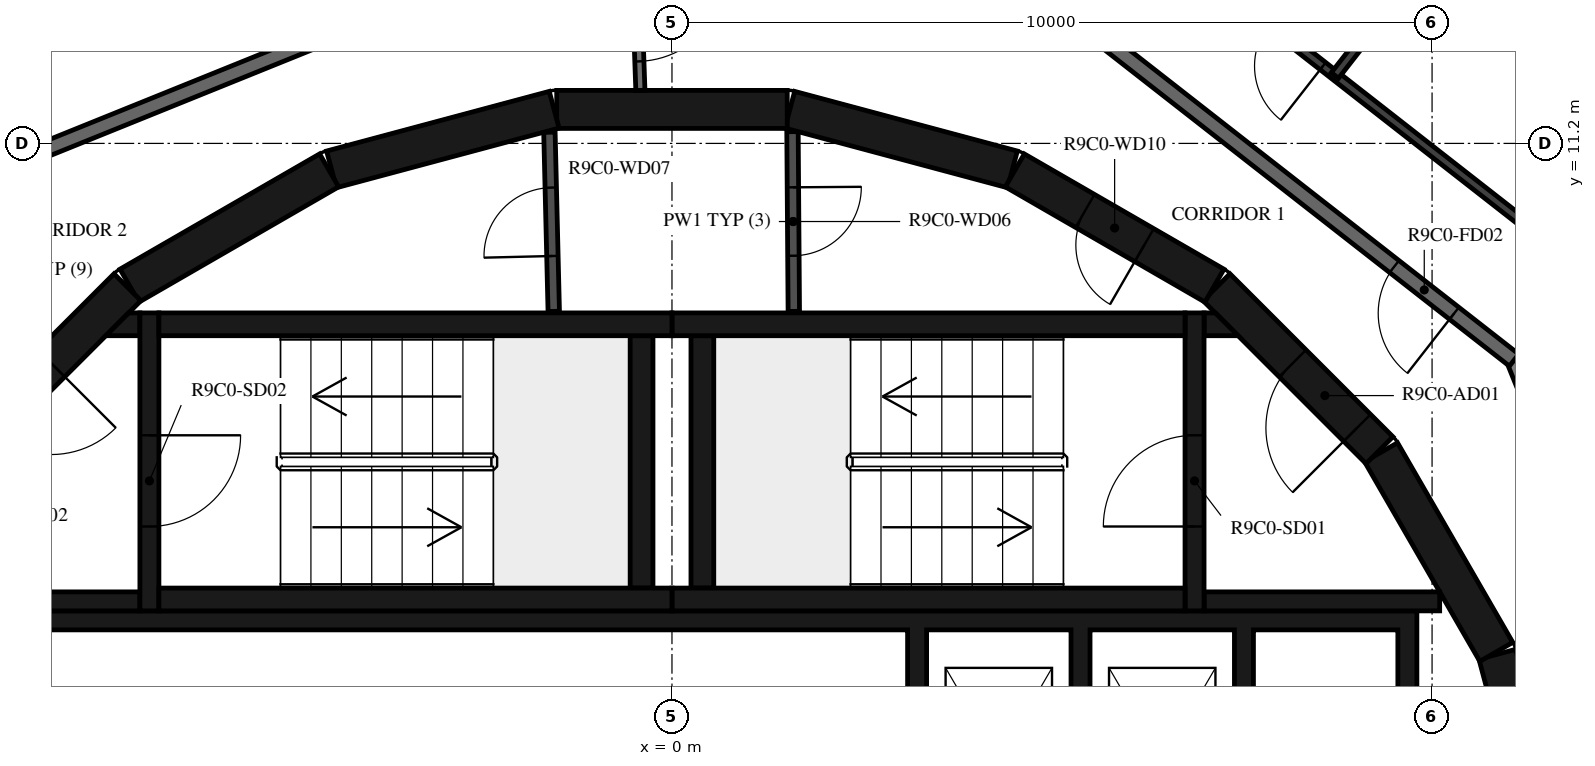
"""IFC4 building model, lengths in metres.
Left out: names, types, materials, properties, quantities, classifications, styles, units other than length and angle.
Written with IfcOpenShell. Run it as: python <this file> out.ifc"""

import sys

from ifc_helpers import new_model, si_unit, direction, frame, frame_2d, origin, place, context, subcontext, project, spatial, polyline, rectangle, outline, extrude, element, fill, save


model = new_model("IFC4")
c1 = context("Model", 3, precision=1e-05, world=origin(), true_north=direction((0.0, 1.0)))
c2 = subcontext(c1, "Body", "Model", "MODEL_VIEW")
j1 = project(units=[si_unit("LENGTHUNIT", "METRE"), si_unit("PLANEANGLEUNIT", "RADIAN")], contexts=[c1])
p1 = place(None, origin())
s1 = spatial("IfcSite", under=j1, at=p1, CompositionType="ELEMENT")
p2 = place(p1, origin())
s2 = spatial("IfcBuilding", under=s1, at=p2, CompositionType="ELEMENT")
p3 = place(p2, frame((0.0, 0.0, 354.0)))
s3 = spatial("IfcBuildingStorey", under=s2, at=p3, CompositionType="ELEMENT", Elevation=354.0)
for number, where, z_axis, x_axis in (
    (1, (11.643, 1.55, 0.0), (0.0, 0.0, 1.0), (-0.259, 0.966, 0.0)),
    (2, (10.845, 4.51, 0.0), (0.0, 0.0, 1.0), (-0.5, 0.866, 0.0)),
):
    element("IfcWall", number, at=place(p3, frame(where, z_axis=z_axis, x_axis=x_axis)), inside=s3, PredefinedType="SHEAR", context=c2, shape_type="SweptSolid", body=[
        extrude(rectangle(XDim=3.033, YDim=0.5, at=frame_2d((1.516, 0.0))), origin(), (0.0, 0.0, 1.0), 3.12),
    ])
p4 = place(p3, frame((9.308, 7.164, 0.0), z_axis=(0.0, 0.0, 1.0), x_axis=(-0.707106781187, 0.707106781187, 0.0)))
e3 = element("IfcWall", 3, at=p4, inside=s3, PredefinedType="SHEAR", context=c2, shape_type="SweptSolid", body=[
    extrude(rectangle(XDim=3.032, YDim=0.5, at=frame_2d((1.516, 0.0))), origin(), (0.0, 0.0, 1.0), 3.12),
])
p5 = place(p4, frame((0.416, 0.0, 0.0)))
e4 = element("IfcOpeningElement", 4, at=p5, cuts=e3, PredefinedType="OPENING", context=c2, shape_type="SweptSolid", body=[
    extrude(rectangle(XDim=1.2, YDim=2.1, at=frame_2d((0.6, 1.05))), frame((0.0, 0.26, 0.0), z_axis=(0.0, -1.0, 0.0), x_axis=(1.0, 0.0, 0.0)), (0.0, 0.0, 1.0), 0.52),
])
p6 = place(p3, frame((7.137, 9.329, 0.0), z_axis=(0.0, 0.0, 1.0), x_axis=(-0.865975092491, 0.500087131594, 0.0)))
e5 = element("IfcWall", 5, at=p6, inside=s3, PredefinedType="SHEAR", context=c2, shape_type="SweptSolid", body=[
    extrude(rectangle(XDim=3.033, YDim=0.5, at=frame_2d((1.516, 0.0))), origin(), (0.0, 0.0, 1.0), 3.12),
])
p7 = place(p6, frame((1.066, 0.0, 0.0)))
e6 = element("IfcOpeningElement", 6, at=p7, cuts=e5, PredefinedType="OPENING", context=c2, shape_type="SweptSolid", body=[
    extrude(rectangle(XDim=0.9, YDim=2.1, at=frame_2d((0.45, 1.05))), frame((0.0, 0.26, 0.0), z_axis=(0.0, -1.0, 0.0), x_axis=(1.0, 0.0, 0.0)), (0.0, 0.0, 1.0), 0.52),
])
for number, where, z_axis, x_axis in (
    (7, (4.479, 10.858, 0.0), (0.0, 0.0, 1.0), (-0.966, 0.259, 0.0)),
    (8, (1.516, 11.647, 0.0), (0.0, 0.0, 1.0), (-1.0, 0.0, 0.0)),
    (9, (-1.55, 11.643, 0.0), (0.0, 0.0, 1.0), (-0.966, -0.259, 0.0)),
    (10, (-4.51, 10.845, 0.0), (0.0, 0.0, 1.0), (-0.866, -0.5, 0.0)),
):
    element("IfcWall", number, at=place(p3, frame(where, z_axis=z_axis, x_axis=x_axis)), inside=s3, PredefinedType="SHEAR", context=c2, shape_type="SweptSolid", body=[
        extrude(rectangle(XDim=3.033, YDim=0.5, at=frame_2d((1.516, 0.0))), origin(), (0.0, 0.0, 1.0), 3.12),
    ])
p8 = place(p3, frame((-7.164, 9.308, 0.0), z_axis=(0.0, 0.0, 1.0), x_axis=(-0.707106781187, -0.707106781187, 0.0)))
e11 = element("IfcWall", 11, at=p8, inside=s3, PredefinedType="SHEAR", context=c2, shape_type="SweptSolid", body=[
    extrude(rectangle(XDim=3.032, YDim=0.5, at=frame_2d((1.516, 0.0))), origin(), (0.0, 0.0, 1.0), 3.12),
])
p9 = place(p8, frame((1.416, 0.0, 0.0)))
e12 = element("IfcOpeningElement", 12, at=p9, cuts=e11, PredefinedType="OPENING", context=c2, shape_type="SweptSolid", body=[
    extrude(rectangle(XDim=1.2, YDim=2.1, at=frame_2d((0.6, 1.05))), frame((0.0, 0.26, 0.0), z_axis=(0.0, -1.0, 0.0), x_axis=(1.0, 0.0, 0.0)), (0.0, 0.0, 1.0), 0.52),
])
for number, where, z_axis, x_axis in (
    (13, (0.0, 5.2, 0.0), (0.0, 0.0, 1.0), (1.0, 0.0, 0.0)),
    (14, (0.0, 8.82, 0.0), (0.0, 0.0, 1.0), (1.0, 0.0, 0.0)),
):
    element("IfcWall", number, at=place(p3, frame(where, z_axis=z_axis, x_axis=x_axis)), inside=s3, PredefinedType="SHEAR", context=c2, shape_type="SweptSolid", body=[
        extrude(rectangle(XDim=6.75, YDim=0.3, at=frame_2d((3.375, 0.0))), origin(), (0.0, 0.0, 1.0), 3.12),
    ])
p10 = place(p3, frame((0.4, 5.35, 0.0), z_axis=(0.0, 0.0, 1.0), x_axis=(0.0, 1.0, 0.0)))
e15 = element("IfcWall", 15, at=p10, inside=s3, PredefinedType="SHEAR", context=c2, shape_type="SweptSolid", body=[
    extrude(rectangle(XDim=3.32, YDim=0.3, at=frame_2d((1.66, 0.0))), origin(), (0.0, 0.0, 1.0), 3.12),
])
p11 = place(p3, frame((6.875, 5.05, 0.0), z_axis=(0.0, 0.0, 1.0), x_axis=(0.0, 1.0, 0.0)))
e16 = element("IfcWall", 16, at=p11, inside=s3, PredefinedType="SHEAR", context=c2, shape_type="SweptSolid", body=[
    extrude(rectangle(XDim=3.92, YDim=0.25, at=frame_2d((1.96, 0.0))), origin(), (0.0, 0.0, 1.0), 3.12),
])
p12 = place(p11, frame((1.11, 0.0, 0.0)))
e17 = element("IfcOpeningElement", 17, at=p12, cuts=e16, PredefinedType="OPENING", context=c2, shape_type="SweptSolid", body=[
    extrude(rectangle(XDim=1.2, YDim=2.1, at=frame_2d((0.6, 1.05))), frame((0.0, 0.135, 0.0), z_axis=(0.0, -1.0, 0.0), x_axis=(1.0, 0.0, 0.0)), (0.0, 0.0, 1.0), 0.27),
])
p13 = place(p3, frame((7.0, 5.175, 0.0), z_axis=(0.0, 0.0, 1.0), x_axis=(1.0, 0.0, 0.0)))
e18 = element("IfcWall", 18, at=p13, inside=s3, PredefinedType="SHEAR", context=c2, shape_type="SweptSolid", body=[
    extrude(rectangle(XDim=3.1, YDim=0.25, at=frame_2d((1.55, 0.0))), origin(), (0.0, 0.0, 1.0), 3.12),
])
p14 = place(p3, origin())
e19 = element("IfcWall", 19, at=p14, inside=s3, PredefinedType="SHEAR", context=c2, shape_type="SweptSolid", body=[
    extrude(outline(polyline([(7.448, 8.67), (7.0, 8.67), (7.0, 8.97), (7.148, 8.97), (7.448, 8.67)])), origin(), (0.0, 0.0, 1.0), 3.12),
])
for number, where, z_axis, x_axis in (
    (20, (-6.75, 5.2, 0.0), (0.0, 0.0, 1.0), (1.0, 0.0, 0.0)),
    (21, (-6.75, 8.82, 0.0), (0.0, 0.0, 1.0), (1.0, 0.0, 0.0)),
):
    element("IfcWall", number, at=place(p3, frame(where, z_axis=z_axis, x_axis=x_axis)), inside=s3, PredefinedType="SHEAR", context=c2, shape_type="SweptSolid", body=[
        extrude(rectangle(XDim=6.75, YDim=0.3, at=frame_2d((3.375, 0.0))), origin(), (0.0, 0.0, 1.0), 3.12),
    ])
p15 = place(p3, frame((-0.4, 5.35, 0.0), z_axis=(0.0, 0.0, 1.0), x_axis=(0.0, 1.0, 0.0)))
e22 = element("IfcWall", 22, at=p15, inside=s3, PredefinedType="SHEAR", context=c2, shape_type="SweptSolid", body=[
    extrude(rectangle(XDim=3.32, YDim=0.3, at=frame_2d((1.66, 0.0))), origin(), (0.0, 0.0, 1.0), 3.12),
])
p16 = place(p3, frame((-6.875, 8.97, 0.0), z_axis=(0.0, 0.0, 1.0), x_axis=(0.0, -1.0, 0.0)))
e23 = element("IfcWall", 23, at=p16, inside=s3, PredefinedType="SHEAR", context=c2, shape_type="SweptSolid", body=[
    extrude(rectangle(XDim=3.92, YDim=0.25, at=frame_2d((1.96, 0.0))), origin(), (0.0, 0.0, 1.0), 3.12),
])
p17 = place(p16, frame((1.61, 0.0, 0.0)))
e24 = element("IfcOpeningElement", 24, at=p17, cuts=e23, PredefinedType="OPENING", context=c2, shape_type="SweptSolid", body=[
    extrude(rectangle(XDim=1.2, YDim=2.1, at=frame_2d((0.6, 1.05))), frame((0.0, 0.135, 0.0), z_axis=(0.0, -1.0, 0.0), x_axis=(1.0, 0.0, 0.0)), (0.0, 0.0, 1.0), 0.27),
])
p18 = place(p3, frame((-7.0, 5.175, 0.0), z_axis=(0.0, 0.0, 1.0), x_axis=(-1.0, 0.0, 0.0)))
e25 = element("IfcWall", 25, at=p18, inside=s3, PredefinedType="SHEAR", context=c2, shape_type="SweptSolid", body=[
    extrude(rectangle(XDim=3.1, YDim=0.25, at=frame_2d((1.55, 0.0))), origin(), (0.0, 0.0, 1.0), 3.12),
])
p19 = place(p3, origin())
e26 = element("IfcWall", 26, at=p19, inside=s3, PredefinedType="SHEAR", context=c2, shape_type="SweptSolid", body=[
    extrude(outline(polyline([(-7.148, 8.97), (-7.0, 8.97), (-7.0, 8.67), (-7.448, 8.67), (-7.148, 8.97)])), origin(), (0.0, 0.0, 1.0), 3.12),
])
p20 = place(p3, origin())
e27 = element("IfcWall", 27, at=p20, inside=s3, PredefinedType="SHEAR", context=c2, shape_type="SweptSolid", body=[
    extrude(outline(polyline([(-9.8, 1.9), (-9.55, 1.9), (-9.55, 4.8), (3.1, 4.8), (3.1, 1.9), (3.35, 1.9), (3.35, 4.8), (5.25, 4.8), (5.25, 1.9), (5.5, 1.9), (5.5, 4.8), (7.4, 4.8), (7.4, 1.9), (7.65, 1.9), (7.65, 4.8), (9.55, 4.8), (9.55, 1.9), (9.8, 1.9), (9.8, 4.8), (9.8, 5.05), (-9.8, 5.05), (-9.8, 4.8), (-9.8, 1.9)])), origin(), (0.0, 0.0, 1.0), 3.12),
])
p21 = place(p3, frame((1.586, 11.354, 0.0), z_axis=(0.0, 0.0, 1.0), x_axis=(0.007227482881, -0.999973881405, 0.0)))
e28 = element("IfcWall", 28, at=p21, inside=s3, PredefinedType="PARTITIONING", context=c2, shape_type="SweptSolid", body=[
    extrude(rectangle(XDim=2.365, YDim=0.15, at=frame_2d((1.182, 0.0))), origin(), (0.0, 0.0, 1.0), 3.12),
])
p22 = place(p21, frame((0.732, 0.0, 0.0)))
e29 = element("IfcOpeningElement", 29, at=p22, cuts=e28, PredefinedType="OPENING", context=c2, shape_type="SweptSolid", body=[
    extrude(rectangle(XDim=0.9, YDim=2.1, at=frame_2d((0.45, 1.05))), frame((0.0, 0.085, 0.0), z_axis=(0.0, -1.0, 0.0), x_axis=(1.0, 0.0, 0.0)), (0.0, 0.0, 1.0), 0.17),
])
p23 = place(p3, frame((-1.555, 8.99, 0.0), z_axis=(0.0, 0.0, 1.0), x_axis=(-0.024125549686, 0.999708936567, 0.0)))
e30 = element("IfcWall", 30, at=p23, inside=s3, PredefinedType="PARTITIONING", context=c2, shape_type="SweptSolid", body=[
    extrude(rectangle(XDim=2.358, YDim=0.15, at=frame_2d((1.179, 0.0))), origin(), (0.0, 0.0, 1.0), 3.12),
])
p24 = place(p23, frame((0.729, 0.0, 0.0)))
e31 = element("IfcOpeningElement", 31, at=p24, cuts=e30, PredefinedType="OPENING", context=c2, shape_type="SweptSolid", body=[
    extrude(rectangle(XDim=0.9, YDim=2.1, at=frame_2d((0.45, 1.05))), frame((0.0, 0.085, 0.0), z_axis=(0.0, -1.0, 0.0), x_axis=(1.0, 0.0, 0.0)), (0.0, 0.0, 1.0), 0.17),
])
p25 = place(p3, frame((-0.475, 13.598, 0.0), z_axis=(0.0, 0.0, 1.0), x_axis=(0.034852521429, -0.999392466326, 0.0)))
e32 = element("IfcWall", 32, at=p25, inside=s3, PredefinedType="PARTITIONING", context=c2, shape_type="SweptSolid", body=[
    extrude(rectangle(XDim=1.702, YDim=0.12, at=frame_2d((0.851, 0.0))), origin(), (0.0, 0.0, 1.0), 3.12),
])
p26 = place(p25, frame((0.12, 0.0, 0.0)))
e33 = element("IfcOpeningElement", 33, at=p26, cuts=e32, PredefinedType="OPENING", context=c2, shape_type="SweptSolid", body=[
    extrude(rectangle(XDim=1.2, YDim=2.1, at=frame_2d((0.6, 1.05))), frame((0.0, 0.07, 0.0), z_axis=(0.0, -1.0, 0.0), x_axis=(1.0, 0.0, 0.0)), (0.0, 0.0, 1.0), 0.14),
])
p27 = place(p3, frame((13.769, 1.691, 0.0), z_axis=(0.0, 0.0, 1.0), x_axis=(-0.374618189599, 0.92717916932, 0.0)))
e34 = element("IfcWall", 34, at=p27, inside=s3, PredefinedType="STANDARD", context=c2, shape_type="SweptSolid", body=[
    extrude(rectangle(XDim=7.181, YDim=0.2, at=frame_2d((3.591, 0.0))), origin(), (0.0, 0.0, 1.0), 3.12),
])
p28 = place(p27, frame((2.41, 0.0, 0.0)))
e35 = element("IfcOpeningElement", 35, at=p28, cuts=e34, PredefinedType="OPENING", context=c2, shape_type="SweptSolid", body=[
    extrude(rectangle(XDim=1.0, YDim=2.1, at=frame_2d((0.5, 1.05))), frame((0.0, 0.11, 0.0), z_axis=(0.0, -1.0, 0.0), x_axis=(1.0, 0.0, 0.0)), (0.0, 0.0, 1.0), 0.22),
])
p29 = place(p3, frame((11.079, 8.349, 0.0), z_axis=(0.0, 0.0, 1.0), x_axis=(-0.78800478687, 0.615669112324, 0.0)))
e36 = element("IfcWall", 36, at=p29, inside=s3, PredefinedType="STANDARD", context=c2, shape_type="SweptSolid", body=[
    extrude(rectangle(XDim=7.181, YDim=0.2, at=frame_2d((3.591, 0.0))), origin(), (0.0, 0.0, 1.0), 3.12),
])
p30 = place(p29, frame((1.0, 0.0, 0.0)))
e37 = element("IfcOpeningElement", 37, at=p30, cuts=e36, PredefinedType="OPENING", context=c2, shape_type="SweptSolid", body=[
    extrude(rectangle(XDim=1.0, YDim=2.1, at=frame_2d((0.5, 1.05))), frame((0.0, 0.11, 0.0), z_axis=(0.0, -1.0, 0.0), x_axis=(1.0, 0.0, 0.0)), (0.0, 0.0, 1.0), 0.22),
])
p31 = place(p3, frame((-1.691, 13.769, 0.0), z_axis=(0.0, 0.0, 1.0), x_axis=(-0.92717916932, -0.374618189599, 0.0)))
e38 = element("IfcWall", 38, at=p31, inside=s3, PredefinedType="STANDARD", context=c2, shape_type="SweptSolid", body=[
    extrude(rectangle(XDim=7.181, YDim=0.2, at=frame_2d((3.591, 0.0))), origin(), (0.0, 0.0, 1.0), 3.12),
])
p32 = place(p3, frame((12.254, 9.334, 0.0), z_axis=(0.0, 0.0, 1.0), x_axis=(-0.787994393996, 0.615682414098, 0.0)))
e39 = element("IfcWall", 39, at=p32, inside=s3, PredefinedType="PARTITIONING", context=c2, shape_type="SweptSolid", body=[
    extrude(rectangle(XDim=7.902, YDim=0.12, at=frame_2d((3.951, 0.0))), origin(), (0.0, 0.0, 1.0), 3.12),
])
p33 = place(p32, frame((0.2, 0.0, 0.0)))
e40 = element("IfcOpeningElement", 40, at=p33, cuts=e39, PredefinedType="OPENING", context=c2, shape_type="SweptSolid", body=[
    extrude(rectangle(XDim=0.9, YDim=2.1, at=frame_2d((0.45, 1.05))), frame((0.0, 0.07, 0.0), z_axis=(0.0, -1.0, 0.0), x_axis=(1.0, 0.0, 0.0)), (0.0, 0.0, 1.0), 0.14),
])
p34 = place(p32, frame((4.683, 0.0, 0.0)))
e41 = element("IfcOpeningElement", 41, at=p34, cuts=e39, PredefinedType="OPENING", context=c2, shape_type="SweptSolid", body=[
    extrude(rectangle(XDim=0.9, YDim=2.1, at=frame_2d((0.45, 1.05))), frame((0.0, 0.07, 0.0), z_axis=(0.0, -1.0, 0.0), x_axis=(1.0, 0.0, 0.0)), (0.0, 0.0, 1.0), 0.14),
])
p35 = place(p3, frame((11.315, 15.414, 0.0), z_axis=(0.0, 0.0, 1.0), x_axis=(-0.615656413137, -0.788014708596, 0.0)))
e42 = element("IfcWall", 42, at=p35, inside=s3, PredefinedType="PARTITIONING", context=c2, shape_type="SweptSolid", body=[
    extrude(rectangle(XDim=4.213, YDim=0.12, at=frame_2d((2.106, 0.0))), origin(), (0.0, 0.0, 1.0), 3.12),
])
p36 = place(p3, frame((-6.118, 13.598, 0.0), z_axis=(0.0, 0.0, 1.0), x_axis=(-0.927163982911, -0.374655773735, 0.0)))
e43 = element("IfcWall", 43, at=p36, inside=s3, PredefinedType="PARTITIONING", context=c2, shape_type="SweptSolid", body=[
    extrude(rectangle(XDim=3.414, YDim=0.12, at=frame_2d((1.707, 0.0))), origin(), (0.0, 0.0, 1.0), 3.12),
])
p37 = place(p36, frame((0.2, 0.0, 0.0)))
e44 = element("IfcOpeningElement", 44, at=p37, cuts=e43, PredefinedType="OPENING", context=c2, shape_type="SweptSolid", body=[
    extrude(rectangle(XDim=0.9, YDim=2.1, at=frame_2d((0.45, 1.05))), frame((0.0, 0.07, 0.0), z_axis=(0.0, -1.0, 0.0), x_axis=(1.0, 0.0, 0.0)), (0.0, 0.0, 1.0), 0.14),
])
p38 = place(p12, origin())
e45 = element("IfcDoor", 45, at=p38, inside=s3, OperationType="SINGLE_SWING_LEFT", PredefinedType="DOOR", context=c2, shape_type="SweptSolid", body=[
    extrude(rectangle(XDim=1.2, YDim=2.1, at=frame_2d((0.6, 1.05))), frame((0.0, 0.025, 0.0), z_axis=(0.0, -1.0, 0.0), x_axis=(1.0, 0.0, 0.0)), (0.0, 0.0, 1.0), 0.05),
])
fill(e17, e45)
p39 = place(p5, origin())
e46 = element("IfcDoor", 46, at=p39, inside=s3, OperationType="SINGLE_SWING_RIGHT", PredefinedType="DOOR", context=c2, shape_type="SweptSolid", body=[
    extrude(rectangle(XDim=1.2, YDim=2.1, at=frame_2d((0.6, 1.05))), frame((0.0, 0.025, 0.0), z_axis=(0.0, -1.0, 0.0), x_axis=(1.0, 0.0, 0.0)), (0.0, 0.0, 1.0), 0.05),
])
fill(e4, e46)
p40 = place(p17, origin())
e47 = element("IfcDoor", 47, at=p40, inside=s3, OperationType="SINGLE_SWING_LEFT", PredefinedType="DOOR", context=c2, shape_type="SweptSolid", body=[
    extrude(rectangle(XDim=1.2, YDim=2.1, at=frame_2d((0.6, 1.05))), frame((0.0, 0.025, 0.0), z_axis=(0.0, -1.0, 0.0), x_axis=(1.0, 0.0, 0.0)), (0.0, 0.0, 1.0), 0.05),
])
fill(e24, e47)
p41 = place(p9, origin())
e48 = element("IfcDoor", 48, at=p41, inside=s3, OperationType="SINGLE_SWING_RIGHT", PredefinedType="DOOR", context=c2, shape_type="SweptSolid", body=[
    extrude(rectangle(XDim=1.2, YDim=2.1, at=frame_2d((0.6, 1.05))), frame((0.0, 0.025, 0.0), z_axis=(0.0, -1.0, 0.0), x_axis=(1.0, 0.0, 0.0)), (0.0, 0.0, 1.0), 0.05),
])
fill(e12, e48)
p42 = place(p22, origin())
e49 = element("IfcDoor", 49, at=p42, inside=s3, OperationType="SINGLE_SWING_RIGHT", PredefinedType="DOOR", context=c2, shape_type="SweptSolid", body=[
    extrude(rectangle(XDim=0.9, YDim=2.1, at=frame_2d((0.45, 1.05))), frame((0.0, 0.025, 0.0), z_axis=(0.0, -1.0, 0.0), x_axis=(1.0, 0.0, 0.0)), (0.0, 0.0, 1.0), 0.05),
])
fill(e29, e49)
p43 = place(p24, origin())
e50 = element("IfcDoor", 50, at=p43, inside=s3, OperationType="SINGLE_SWING_LEFT", PredefinedType="DOOR", context=c2, shape_type="SweptSolid", body=[
    extrude(rectangle(XDim=0.9, YDim=2.1, at=frame_2d((0.45, 1.05))), frame((0.0, 0.025, 0.0), z_axis=(0.0, -1.0, 0.0), x_axis=(1.0, 0.0, 0.0)), (0.0, 0.0, 1.0), 0.05),
])
fill(e31, e50)
p44 = place(p7, origin())
e51 = element("IfcDoor", 51, at=p44, inside=s3, OperationType="SINGLE_SWING_RIGHT", PredefinedType="DOOR", context=c2, shape_type="SweptSolid", body=[
    extrude(rectangle(XDim=0.9, YDim=2.1, at=frame_2d((0.45, 1.05))), frame((0.0, 0.025, 0.0), z_axis=(0.0, -1.0, 0.0), x_axis=(1.0, 0.0, 0.0)), (0.0, 0.0, 1.0), 0.05),
])
fill(e6, e51)
p45 = place(p30, origin())
e52 = element("IfcDoor", 52, at=p45, inside=s3, OperationType="SINGLE_SWING_LEFT", PredefinedType="DOOR", context=c2, shape_type="SweptSolid", body=[
    extrude(rectangle(XDim=1.0, YDim=2.1, at=frame_2d((0.5, 1.05))), frame((0.0, 0.025, 0.0), z_axis=(0.0, -1.0, 0.0), x_axis=(1.0, 0.0, 0.0)), (0.0, 0.0, 1.0), 0.05),
])
fill(e37, e52)
p46 = place(p34, origin())
e53 = element("IfcDoor", 53, at=p46, inside=s3, OperationType="SINGLE_SWING_LEFT", PredefinedType="DOOR", context=c2, shape_type="SweptSolid", body=[
    extrude(rectangle(XDim=0.9, YDim=2.1, at=frame_2d((0.45, 1.05))), frame((0.0, 0.025, 0.0), z_axis=(0.0, -1.0, 0.0), x_axis=(1.0, 0.0, 0.0)), (0.0, 0.0, 1.0), 0.05),
])
fill(e41, e53)
p47 = place(p26, origin())
e54 = element("IfcDoor", 54, at=p47, inside=s3, OperationType="DOUBLE_DOOR_SINGLE_SWING", PredefinedType="DOOR", context=c2, shape_type="SweptSolid", body=[
    extrude(rectangle(XDim=1.2, YDim=2.1, at=frame_2d((0.6, 1.05))), frame((0.0, 0.025, 0.0), z_axis=(0.0, -1.0, 0.0), x_axis=(1.0, 0.0, 0.0)), (0.0, 0.0, 1.0), 0.05),
])
fill(e33, e54)
save(model, sys.argv[1])
